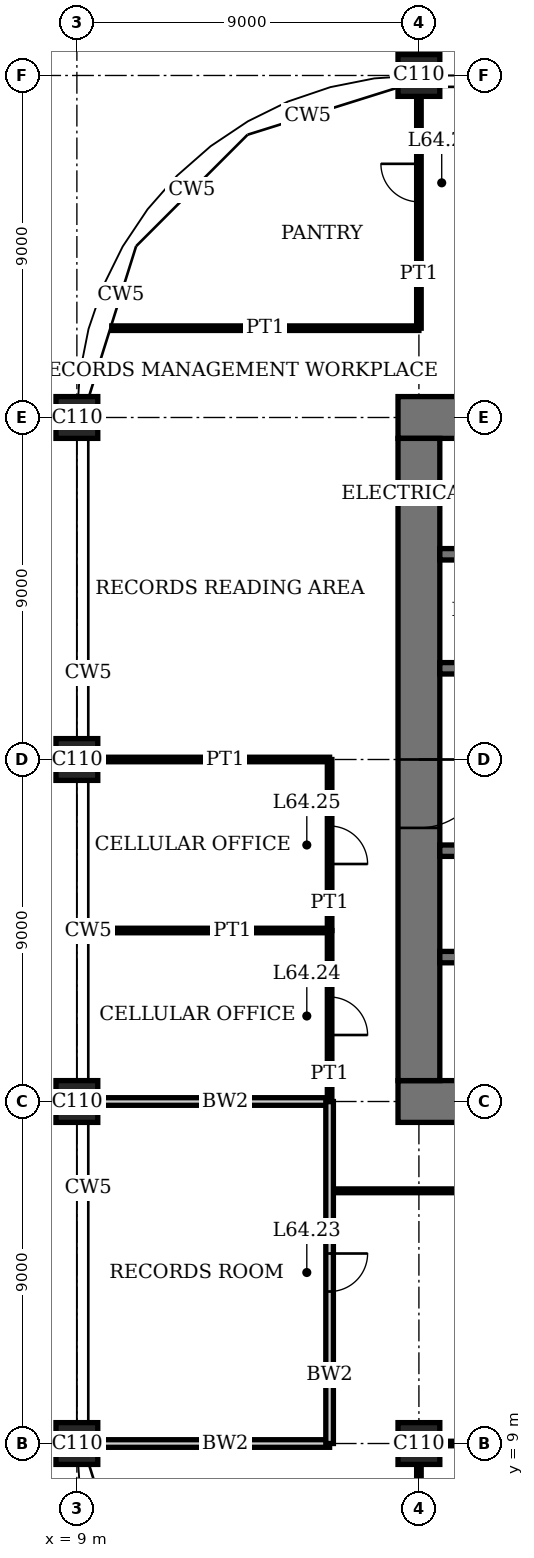
"""IFC4 building model, lengths in metres.
Left out: names, types, materials, properties, quantities, classifications, styles, units other than length and angle.
Written with IfcOpenShell. Run it as: python <this file> out.ifc"""

import sys

from ifc_helpers import new_model, si_unit, direction, frame, frame_2d, origin, origin_2d, place, context, subcontext, project, spatial, rectangle, extrude, element, fill, save


model = new_model("IFC4")
c1 = context("Model", 3, precision=1e-05, world=origin(), true_north=direction((0.0, 1.0)))
c2 = subcontext(c1, "Body", "Model", "MODEL_VIEW")
j1 = project(units=[si_unit("LENGTHUNIT", "METRE"), si_unit("PLANEANGLEUNIT", "RADIAN")], contexts=[c1])
p1 = place(None, origin())
s1 = spatial("IfcSite", under=j1, at=p1, CompositionType="ELEMENT")
p2 = place(p1, origin())
s2 = spatial("IfcBuilding", under=s1, at=p2, CompositionType="ELEMENT")
p3 = place(p2, frame((0.0, 0.0, 263.4)))
s3 = spatial("IfcBuildingStorey", under=s2, at=p3, CompositionType="ELEMENT", Elevation=263.4)
for number, where, z_axis, x_axis in (
    (1, (9.0, 9.0, 0.0), (0.0, 0.0, 1.0), (1.0, 0.0, 0.0)),
    (2, (9.0, 18.0, 0.0), (0.0, 0.0, 1.0), (1.0, 0.0, 0.0)),
    (3, (9.0, 27.0, 0.0), (0.0, 0.0, 1.0), (1.0, 0.0, 0.0)),
    (4, (9.0, 36.0, 0.0), (0.0, 0.0, 1.0), (1.0, 0.0, 0.0)),
    (5, (18.0, 9.0, 0.0), (0.0, 0.0, 1.0), (1.0, 0.0, 0.0)),
    (6, (18.0, 45.0, 0.0), (0.0, 0.0, 1.0), (1.0, 0.0, 0.0)),
):
    element("IfcColumn", number, at=place(p3, frame(where, z_axis=z_axis, x_axis=x_axis)), inside=s3, PredefinedType="COLUMN", context=c2, shape_type="SweptSolid", body=[
        extrude(rectangle(XDim=1.1, YDim=1.1, at=origin_2d()), origin(), (0.0, 0.0, 1.0), 4.0),
    ])
p4 = place(p3, frame((17.45, 18.0, 0.0), z_axis=(0.0, 0.0, 1.0), x_axis=(1.0, 0.0, 0.0)))
e7 = element("IfcWall", 7, at=p4, inside=s3, PredefinedType="SHEAR", context=c2, shape_type="SweptSolid", body=[
    extrude(rectangle(XDim=28.1, YDim=1.1, at=frame_2d((14.05, 0.0))), origin(), (0.0, 0.0, 1.0), 4.0),
])
p5 = place(p4, frame((11.55, 0.0, 0.0)))
e8 = element("IfcOpeningElement", 8, at=p5, cuts=e7, PredefinedType="OPENING", context=c2, shape_type="SweptSolid", body=[
    extrude(rectangle(XDim=1.0, YDim=2.4, at=frame_2d((0.5, 1.2))), frame((0.0, 0.56, 0.0), z_axis=(0.0, -1.0, 0.0), x_axis=(1.0, 0.0, 0.0)), (0.0, 0.0, 1.0), 1.12),
])
p6 = place(p4, frame((16.55, 0.0, 0.0)))
e9 = element("IfcOpeningElement", 9, at=p6, cuts=e7, PredefinedType="OPENING", context=c2, shape_type="SweptSolid", body=[
    extrude(rectangle(XDim=1.0, YDim=2.4, at=frame_2d((0.5, 1.2))), frame((0.0, 0.56, 0.0), z_axis=(0.0, -1.0, 0.0), x_axis=(1.0, 0.0, 0.0)), (0.0, 0.0, 1.0), 1.12),
])
p7 = place(p4, frame((20.0, 0.0, 0.0)))
e10 = element("IfcOpeningElement", 10, at=p7, cuts=e7, PredefinedType="OPENING", context=c2, shape_type="SweptSolid", body=[
    extrude(rectangle(XDim=1.1, YDim=2.4, at=frame_2d((0.55, 1.2))), frame((0.0, 0.56, 0.0), z_axis=(0.0, -1.0, 0.0), x_axis=(1.0, 0.0, 0.0)), (0.0, 0.0, 1.0), 1.12),
])
p8 = place(p4, frame((24.05, 0.0, 0.0)))
e11 = element("IfcOpeningElement", 11, at=p8, cuts=e7, PredefinedType="OPENING", context=c2, shape_type="SweptSolid", body=[
    extrude(rectangle(XDim=1.0, YDim=2.4, at=frame_2d((0.5, 1.2))), frame((0.0, 0.56, 0.0), z_axis=(0.0, -1.0, 0.0), x_axis=(1.0, 0.0, 0.0)), (0.0, 0.0, 1.0), 1.12),
])
p9 = place(p3, frame((45.55, 36.0, 0.0), z_axis=(0.0, 0.0, 1.0), x_axis=(-1.0, 0.0, 0.0)))
e12 = element("IfcWall", 12, at=p9, inside=s3, PredefinedType="SHEAR", context=c2, shape_type="SweptSolid", body=[
    extrude(rectangle(XDim=28.1, YDim=1.1, at=frame_2d((14.05, 0.0))), origin(), (0.0, 0.0, 1.0), 4.0),
])
p10 = place(p9, frame((11.55, 0.0, 0.0)))
e13 = element("IfcOpeningElement", 13, at=p10, cuts=e12, PredefinedType="OPENING", context=c2, shape_type="SweptSolid", body=[
    extrude(rectangle(XDim=1.0, YDim=2.4, at=frame_2d((0.5, 1.2))), frame((0.0, 0.56, 0.0), z_axis=(0.0, -1.0, 0.0), x_axis=(1.0, 0.0, 0.0)), (0.0, 0.0, 1.0), 1.12),
])
p11 = place(p9, frame((16.55, 0.0, 0.0)))
e14 = element("IfcOpeningElement", 14, at=p11, cuts=e12, PredefinedType="OPENING", context=c2, shape_type="SweptSolid", body=[
    extrude(rectangle(XDim=1.0, YDim=2.4, at=frame_2d((0.5, 1.2))), frame((0.0, 0.56, 0.0), z_axis=(0.0, -1.0, 0.0), x_axis=(1.0, 0.0, 0.0)), (0.0, 0.0, 1.0), 1.12),
])
p12 = place(p9, frame((20.0, 0.0, 0.0)))
e15 = element("IfcOpeningElement", 15, at=p12, cuts=e12, PredefinedType="OPENING", context=c2, shape_type="SweptSolid", body=[
    extrude(rectangle(XDim=1.1, YDim=2.4, at=frame_2d((0.55, 1.2))), frame((0.0, 0.56, 0.0), z_axis=(0.0, -1.0, 0.0), x_axis=(1.0, 0.0, 0.0)), (0.0, 0.0, 1.0), 1.12),
])
p13 = place(p9, frame((24.05, 0.0, 0.0)))
e16 = element("IfcOpeningElement", 16, at=p13, cuts=e12, PredefinedType="OPENING", context=c2, shape_type="SweptSolid", body=[
    extrude(rectangle(XDim=1.0, YDim=2.4, at=frame_2d((0.5, 1.2))), frame((0.0, 0.56, 0.0), z_axis=(0.0, -1.0, 0.0), x_axis=(1.0, 0.0, 0.0)), (0.0, 0.0, 1.0), 1.12),
])
p14 = place(p3, frame((18.0, 35.45, 0.0), z_axis=(0.0, 0.0, 1.0), x_axis=(0.0, -1.0, 0.0)))
e17 = element("IfcWall", 17, at=p14, inside=s3, PredefinedType="SHEAR", context=c2, shape_type="SweptSolid", body=[
    extrude(rectangle(XDim=16.9, YDim=1.1, at=frame_2d((8.45, 0.0))), origin(), (0.0, 0.0, 1.0), 4.0),
])
p15 = place(p14, frame((8.45, 0.0, 0.0)))
e18 = element("IfcOpeningElement", 18, at=p15, cuts=e17, PredefinedType="OPENING", context=c2, shape_type="SweptSolid", body=[
    extrude(rectangle(XDim=1.8, YDim=2.4, at=frame_2d((0.9, 1.2))), frame((0.0, 0.56, 0.0), z_axis=(0.0, -1.0, 0.0), x_axis=(1.0, 0.0, 0.0)), (0.0, 0.0, 1.0), 1.12),
])
p16 = place(p3, frame((18.55, 21.8, 0.0), z_axis=(0.0, 0.0, 1.0), x_axis=(1.0, 0.0, 0.0)))
e19 = element("IfcWall", 19, at=p16, inside=s3, PredefinedType="SHEAR", context=c2, shape_type="SweptSolid", body=[
    extrude(rectangle(XDim=8.3, YDim=0.3, at=frame_2d((4.15, 0.0))), origin(), (0.0, 0.0, 1.0), 4.0),
])
p17 = place(p16, frame((6.85, 0.0, 0.0)))
e20 = element("IfcOpeningElement", 20, at=p17, cuts=e19, PredefinedType="OPENING", context=c2, shape_type="SweptSolid", body=[
    extrude(rectangle(XDim=1.0, YDim=2.4, at=frame_2d((0.5, 1.2))), frame((0.0, 0.16, 0.0), z_axis=(0.0, -1.0, 0.0), x_axis=(1.0, 0.0, 0.0)), (0.0, 0.0, 1.0), 0.32),
])
p18 = place(p3, frame((18.55, 24.6, 0.0), z_axis=(0.0, 0.0, 1.0), x_axis=(1.0, 0.0, 0.0)))
e21 = element("IfcWall", 21, at=p18, inside=s3, PredefinedType="SHEAR", context=c2, shape_type="SweptSolid", body=[
    extrude(rectangle(XDim=25.9, YDim=0.3, at=frame_2d((12.95, 0.0))), origin(), (0.0, 0.0, 1.0), 4.0),
])
p19 = place(p18, frame((4.95, 0.0, 0.0)))
e22 = element("IfcOpeningElement", 22, at=p19, cuts=e21, PredefinedType="OPENING", context=c2, shape_type="SweptSolid", body=[
    extrude(rectangle(XDim=1.0, YDim=2.4, at=frame_2d((0.5, 1.2))), frame((0.0, 0.16, 0.0), z_axis=(0.0, -1.0, 0.0), x_axis=(1.0, 0.0, 0.0)), (0.0, 0.0, 1.0), 0.32),
])
p20 = place(p18, frame((24.5, 0.0, 0.0)))
e23 = element("IfcOpeningElement", 23, at=p20, cuts=e21, PredefinedType="OPENING", context=c2, shape_type="SweptSolid", body=[
    extrude(rectangle(XDim=0.9, YDim=2.1, at=frame_2d((0.45, 1.05))), frame((0.0, 0.16, 0.0), z_axis=(0.0, -1.0, 0.0), x_axis=(1.0, 0.0, 0.0)), (0.0, 0.0, 1.0), 0.32),
])
p21 = place(p18, frame((9.4, 0.0, 0.0)))
e24 = element("IfcOpeningElement", 24, at=p21, cuts=e21, PredefinedType="OPENING", context=c2, shape_type="SweptSolid", body=[
    extrude(rectangle(XDim=1.1, YDim=2.4, at=frame_2d((0.55, 1.2))), frame((0.0, 0.16, 0.0), z_axis=(0.0, -1.0, 0.0), x_axis=(1.0, 0.0, 0.0)), (0.0, 0.0, 1.0), 0.32),
])
p22 = place(p18, frame((12.4, 0.0, 0.0)))
e25 = element("IfcOpeningElement", 25, at=p22, cuts=e21, PredefinedType="OPENING", context=c2, shape_type="SweptSolid", body=[
    extrude(rectangle(XDim=1.1, YDim=2.4, at=frame_2d((0.55, 1.2))), frame((0.0, 0.16, 0.0), z_axis=(0.0, -1.0, 0.0), x_axis=(1.0, 0.0, 0.0)), (0.0, 0.0, 1.0), 0.32),
])
p23 = place(p18, frame((15.4, 0.0, 0.0)))
e26 = element("IfcOpeningElement", 26, at=p23, cuts=e21, PredefinedType="OPENING", context=c2, shape_type="SweptSolid", body=[
    extrude(rectangle(XDim=1.1, YDim=2.4, at=frame_2d((0.55, 1.2))), frame((0.0, 0.16, 0.0), z_axis=(0.0, -1.0, 0.0), x_axis=(1.0, 0.0, 0.0)), (0.0, 0.0, 1.0), 0.32),
])
p24 = place(p18, frame((18.4, 0.0, 0.0)))
e27 = element("IfcOpeningElement", 27, at=p24, cuts=e21, PredefinedType="OPENING", context=c2, shape_type="SweptSolid", body=[
    extrude(rectangle(XDim=1.1, YDim=2.4, at=frame_2d((0.55, 1.2))), frame((0.0, 0.16, 0.0), z_axis=(0.0, -1.0, 0.0), x_axis=(1.0, 0.0, 0.0)), (0.0, 0.0, 1.0), 0.32),
])
p25 = place(p18, frame((21.3, 0.0, 0.0)))
e28 = element("IfcOpeningElement", 28, at=p25, cuts=e21, PredefinedType="OPENING", context=c2, shape_type="SweptSolid", body=[
    extrude(rectangle(XDim=1.3, YDim=2.4, at=frame_2d((0.65, 1.2))), frame((0.0, 0.16, 0.0), z_axis=(0.0, -1.0, 0.0), x_axis=(1.0, 0.0, 0.0)), (0.0, 0.0, 1.0), 0.32),
])
p26 = place(p3, frame((18.55, 29.4, 0.0), z_axis=(0.0, 0.0, 1.0), x_axis=(1.0, 0.0, 0.0)))
e29 = element("IfcWall", 29, at=p26, inside=s3, PredefinedType="SHEAR", context=c2, shape_type="SweptSolid", body=[
    extrude(rectangle(XDim=25.9, YDim=0.3, at=frame_2d((12.95, 0.0))), origin(), (0.0, 0.0, 1.0), 4.0),
])
p27 = place(p26, frame((19.95, 0.0, 0.0)))
e30 = element("IfcOpeningElement", 30, at=p27, cuts=e29, PredefinedType="OPENING", context=c2, shape_type="SweptSolid", body=[
    extrude(rectangle(XDim=1.0, YDim=2.4, at=frame_2d((0.5, 1.2))), frame((0.0, 0.16, 0.0), z_axis=(0.0, -1.0, 0.0), x_axis=(1.0, 0.0, 0.0)), (0.0, 0.0, 1.0), 0.32),
])
p28 = place(p26, frame((0.5, 0.0, 0.0)))
e31 = element("IfcOpeningElement", 31, at=p28, cuts=e29, PredefinedType="OPENING", context=c2, shape_type="SweptSolid", body=[
    extrude(rectangle(XDim=0.9, YDim=2.1, at=frame_2d((0.45, 1.05))), frame((0.0, 0.16, 0.0), z_axis=(0.0, -1.0, 0.0), x_axis=(1.0, 0.0, 0.0)), (0.0, 0.0, 1.0), 0.32),
])
p29 = place(p26, frame((15.45, 0.0, 0.0)))
e32 = element("IfcOpeningElement", 32, at=p29, cuts=e29, PredefinedType="OPENING", context=c2, shape_type="SweptSolid", body=[
    extrude(rectangle(XDim=1.0, YDim=2.4, at=frame_2d((0.5, 1.2))), frame((0.0, 0.16, 0.0), z_axis=(0.0, -1.0, 0.0), x_axis=(1.0, 0.0, 0.0)), (0.0, 0.0, 1.0), 0.32),
])
p30 = place(p26, frame((12.45, 0.0, 0.0)))
e33 = element("IfcOpeningElement", 33, at=p30, cuts=e29, PredefinedType="OPENING", context=c2, shape_type="SweptSolid", body=[
    extrude(rectangle(XDim=1.0, YDim=2.4, at=frame_2d((0.5, 1.2))), frame((0.0, 0.16, 0.0), z_axis=(0.0, -1.0, 0.0), x_axis=(1.0, 0.0, 0.0)), (0.0, 0.0, 1.0), 0.32),
])
p31 = place(p26, frame((9.45, 0.0, 0.0)))
e34 = element("IfcOpeningElement", 34, at=p31, cuts=e29, PredefinedType="OPENING", context=c2, shape_type="SweptSolid", body=[
    extrude(rectangle(XDim=1.0, YDim=2.4, at=frame_2d((0.5, 1.2))), frame((0.0, 0.16, 0.0), z_axis=(0.0, -1.0, 0.0), x_axis=(1.0, 0.0, 0.0)), (0.0, 0.0, 1.0), 0.32),
])
p32 = place(p26, frame((6.45, 0.0, 0.0)))
e35 = element("IfcOpeningElement", 35, at=p32, cuts=e29, PredefinedType="OPENING", context=c2, shape_type="SweptSolid", body=[
    extrude(rectangle(XDim=1.0, YDim=2.4, at=frame_2d((0.5, 1.2))), frame((0.0, 0.16, 0.0), z_axis=(0.0, -1.0, 0.0), x_axis=(1.0, 0.0, 0.0)), (0.0, 0.0, 1.0), 0.32),
])
p33 = place(p26, frame((3.3, 0.0, 0.0)))
e36 = element("IfcOpeningElement", 36, at=p33, cuts=e29, PredefinedType="OPENING", context=c2, shape_type="SweptSolid", body=[
    extrude(rectangle(XDim=1.3, YDim=2.4, at=frame_2d((0.65, 1.2))), frame((0.0, 0.16, 0.0), z_axis=(0.0, -1.0, 0.0), x_axis=(1.0, 0.0, 0.0)), (0.0, 0.0, 1.0), 0.32),
])
p34 = place(p3, frame((18.55, 32.4, 0.0), z_axis=(0.0, 0.0, 1.0), x_axis=(1.0, 0.0, 0.0)))
e37 = element("IfcWall", 37, at=p34, inside=s3, PredefinedType="SHEAR", context=c2, shape_type="SweptSolid", body=[
    extrude(rectangle(XDim=17.3, YDim=0.3, at=frame_2d((8.65, 0.0))), origin(), (0.0, 0.0, 1.0), 4.0),
])
p35 = place(p3, frame((9.55, 9.0, 0.0), z_axis=(0.0, 0.0, 1.0), x_axis=(1.0, 0.0, 0.0)))
e38 = element("IfcWall", 38, at=p35, inside=s3, PredefinedType="SOLIDWALL", context=c2, shape_type="SweptSolid", body=[
    extrude(rectangle(XDim=6.1, YDim=0.2, at=frame_2d((3.05, 0.0))), origin(), (0.0, 0.0, 1.0), 3.05),
])
p36 = place(p3, frame((18.55, 9.0, 0.0), z_axis=(0.0, 0.0, 1.0), x_axis=(1.0, 0.0, 0.0)))
e39 = element("IfcWall", 39, at=p36, inside=s3, PredefinedType="PARTITIONING", context=c2, shape_type="SweptSolid", body=[
    extrude(rectangle(XDim=7.9, YDim=0.12, at=frame_2d((3.95, 0.0))), origin(), (0.0, 0.0, 1.0), 3.05),
])
p37 = place(p36, frame((3.45, 0.0, 0.0)))
e40 = element("IfcOpeningElement", 40, at=p37, cuts=e39, PredefinedType="OPENING", context=c2, shape_type="SweptSolid", body=[
    extrude(rectangle(XDim=1.0, YDim=2.4, at=frame_2d((0.5, 1.2))), frame((0.0, 0.07, 0.0), z_axis=(0.0, -1.0, 0.0), x_axis=(1.0, 0.0, 0.0)), (0.0, 0.0, 1.0), 0.14),
])
p38 = place(p3, frame((15.7, 15.65, 0.0), z_axis=(0.0, 0.0, 1.0), x_axis=(1.0, 0.0, 0.0)))
e41 = element("IfcWall", 41, at=p38, inside=s3, PredefinedType="PARTITIONING", context=c2, shape_type="SweptSolid", body=[
    extrude(rectangle(XDim=11.25, YDim=0.1, at=frame_2d((5.625, 0.0))), origin(), (0.0, 0.0, 1.0), 3.75),
])
p39 = place(p3, frame((9.55, 18.0, 0.0), z_axis=(0.0, 0.0, 1.0), x_axis=(1.0, 0.0, 0.0)))
e42 = element("IfcWall", 42, at=p39, inside=s3, PredefinedType="SOLIDWALL", context=c2, shape_type="SweptSolid", body=[
    extrude(rectangle(XDim=6.1, YDim=0.2, at=frame_2d((3.05, 0.0))), origin(), (0.0, 0.0, 1.0), 3.05),
])
p40 = place(p3, frame((9.31, 22.5, 0.0), z_axis=(0.0, 0.0, 1.0), x_axis=(1.0, 0.0, 0.0)))
e43 = element("IfcWall", 43, at=p40, inside=s3, PredefinedType="PARTITIONING", context=c2, shape_type="SweptSolid", body=[
    extrude(rectangle(XDim=6.34, YDim=0.12, at=frame_2d((3.17, 0.0))), origin(), (0.0, 0.0, 1.0), 3.1),
])
p41 = place(p3, frame((9.55, 27.0, 0.0), z_axis=(0.0, 0.0, 1.0), x_axis=(1.0, 0.0, 0.0)))
e44 = element("IfcWall", 44, at=p41, inside=s3, PredefinedType="PARTITIONING", context=c2, shape_type="SweptSolid", body=[
    extrude(rectangle(XDim=6.1, YDim=0.12, at=frame_2d((3.05, 0.0))), origin(), (0.0, 0.0, 1.0), 3.05),
])
p42 = place(p3, frame((9.918, 38.35, 0.0), z_axis=(0.0, 0.0, 1.0), x_axis=(1.0, 0.0, 0.0)))
e45 = element("IfcWall", 45, at=p42, inside=s3, PredefinedType="PARTITIONING", context=c2, shape_type="SweptSolid", body=[
    extrude(rectangle(XDim=8.082, YDim=0.12, at=frame_2d((4.041, 0.0))), origin(), (0.0, 0.0, 1.0), 3.75),
])
p43 = place(p3, frame((15.65, 9.0, 0.0), z_axis=(0.0, 0.0, 1.0), x_axis=(0.0, 1.0, 0.0)))
e46 = element("IfcWall", 46, at=p43, inside=s3, PredefinedType="SOLIDWALL", context=c2, shape_type="SweptSolid", body=[
    extrude(rectangle(XDim=9.0, YDim=0.2, at=frame_2d((4.5, 0.0))), origin(), (0.0, 0.0, 1.0), 3.75),
])
p44 = place(p43, frame((4.0, 0.0, 0.0)))
e47 = element("IfcOpeningElement", 47, at=p44, cuts=e46, PredefinedType="OPENING", context=c2, shape_type="SweptSolid", body=[
    extrude(rectangle(XDim=1.0, YDim=2.4, at=frame_2d((0.5, 1.2))), frame((0.0, 0.11, 0.0), z_axis=(0.0, -1.0, 0.0), x_axis=(1.0, 0.0, 0.0)), (0.0, 0.0, 1.0), 0.22),
])
p45 = place(p3, frame((15.65, 18.0, 0.0), z_axis=(0.0, 0.0, 1.0), x_axis=(0.0, 1.0, 0.0)))
e48 = element("IfcWall", 48, at=p45, inside=s3, PredefinedType="PARTITIONING", context=c2, shape_type="SweptSolid", body=[
    extrude(rectangle(XDim=4.5, YDim=0.12, at=frame_2d((2.25, 0.0))), origin(), (0.0, 0.0, 1.0), 3.75),
])
p46 = place(p45, frame((1.75, 0.0, 0.0)))
e49 = element("IfcOpeningElement", 49, at=p46, cuts=e48, PredefinedType="OPENING", context=c2, shape_type="SweptSolid", body=[
    extrude(rectangle(XDim=1.0, YDim=2.4, at=frame_2d((0.5, 1.2))), frame((0.0, 0.07, 0.0), z_axis=(0.0, -1.0, 0.0), x_axis=(1.0, 0.0, 0.0)), (0.0, 0.0, 1.0), 0.14),
])
p47 = place(p3, frame((15.65, 22.5, 0.0), z_axis=(0.0, 0.0, 1.0), x_axis=(0.0, 1.0, 0.0)))
e50 = element("IfcWall", 50, at=p47, inside=s3, PredefinedType="PARTITIONING", context=c2, shape_type="SweptSolid", body=[
    extrude(rectangle(XDim=4.5, YDim=0.12, at=frame_2d((2.25, 0.0))), origin(), (0.0, 0.0, 1.0), 3.75),
])
p48 = place(p47, frame((1.75, 0.0, 0.0)))
e51 = element("IfcOpeningElement", 51, at=p48, cuts=e50, PredefinedType="OPENING", context=c2, shape_type="SweptSolid", body=[
    extrude(rectangle(XDim=1.0, YDim=2.4, at=frame_2d((0.5, 1.2))), frame((0.0, 0.07, 0.0), z_axis=(0.0, -1.0, 0.0), x_axis=(1.0, 0.0, 0.0)), (0.0, 0.0, 1.0), 0.14),
])
p49 = place(p3, frame((18.0, 0.55, 0.0), z_axis=(0.0, 0.0, 1.0), x_axis=(0.0, 1.0, 0.0)))
e52 = element("IfcWall", 52, at=p49, inside=s3, PredefinedType="PARTITIONING", context=c2, shape_type="SweptSolid", body=[
    extrude(rectangle(XDim=7.9, YDim=0.12, at=frame_2d((3.95, 0.0))), origin(), (0.0, 0.0, 1.0), 3.05),
])
p50 = place(p3, frame((18.0, 38.35, 0.0), z_axis=(0.0, 0.0, 1.0), x_axis=(0.0, 1.0, 0.0)))
e53 = element("IfcWall", 53, at=p50, inside=s3, PredefinedType="PARTITIONING", context=c2, shape_type="SweptSolid", body=[
    extrude(rectangle(XDim=6.1, YDim=0.12, at=frame_2d((3.05, 0.0))), origin(), (0.0, 0.0, 1.0), 3.05),
])
p51 = place(p50, frame((3.325, 0.0, 0.0)))
e54 = element("IfcOpeningElement", 54, at=p51, cuts=e53, PredefinedType="OPENING", context=c2, shape_type="SweptSolid", body=[
    extrude(rectangle(XDim=1.0, YDim=2.4, at=frame_2d((0.5, 1.2))), frame((0.0, 0.07, 0.0), z_axis=(0.0, -1.0, 0.0), x_axis=(1.0, 0.0, 0.0)), (0.0, 0.0, 1.0), 0.14),
])
p52 = place(p15, origin())
e55 = element("IfcDoor", 55, at=p52, inside=s3, OperationType="DOUBLE_DOOR_DOUBLE_SWING", PredefinedType="DOOR", context=c2, shape_type="SweptSolid", body=[
    extrude(rectangle(XDim=1.8, YDim=2.4, at=frame_2d((0.9, 1.2))), frame((0.0, 0.03, 0.0), z_axis=(0.0, -1.0, 0.0), x_axis=(1.0, 0.0, 0.0)), (0.0, 0.0, 1.0), 0.06),
    extrude(rectangle(XDim=0.04, YDim=2.4, at=frame_2d((0.02, 1.2))), frame((0.0, 0.55, 0.0), z_axis=(0.0, -1.0, 0.0), x_axis=(1.0, 0.0, 0.0)), (0.0, 0.0, 1.0), 1.1),
    extrude(rectangle(XDim=0.04, YDim=2.4, at=frame_2d((1.78, 1.2))), frame((0.0, 0.55, 0.0), z_axis=(0.0, -1.0, 0.0), x_axis=(1.0, 0.0, 0.0)), (0.0, 0.0, 1.0), 1.1),
    extrude(rectangle(XDim=1.8, YDim=0.04, at=frame_2d((0.9, 2.38))), frame((0.0, 0.55, 0.0), z_axis=(0.0, -1.0, 0.0), x_axis=(1.0, 0.0, 0.0)), (0.0, 0.0, 1.0), 1.1),
])
fill(e18, e55)
p53 = place(p44, origin())
e56 = element("IfcDoor", 56, at=p53, inside=s3, OperationType="SINGLE_SWING_RIGHT", PredefinedType="DOOR", context=c2, shape_type="SweptSolid", body=[
    extrude(rectangle(XDim=1.0, YDim=2.4, at=frame_2d((0.5, 1.2))), frame((0.0, 0.035, 0.0), z_axis=(0.0, -1.0, 0.0), x_axis=(1.0, 0.0, 0.0)), (0.0, 0.0, 1.0), 0.07),
])
fill(e47, e56)
p54 = place(p46, origin())
e57 = element("IfcDoor", 57, at=p54, inside=s3, OperationType="SINGLE_SWING_LEFT", PredefinedType="DOOR", context=c2, shape_type="SweptSolid", body=[
    extrude(rectangle(XDim=1.0, YDim=2.4, at=frame_2d((0.5, 1.2))), frame((0.0, 0.025, 0.0), z_axis=(0.0, -1.0, 0.0), x_axis=(1.0, 0.0, 0.0)), (0.0, 0.0, 1.0), 0.05),
])
fill(e49, e57)
p55 = place(p48, origin())
e58 = element("IfcDoor", 58, at=p55, inside=s3, OperationType="SINGLE_SWING_LEFT", PredefinedType="DOOR", context=c2, shape_type="SweptSolid", body=[
    extrude(rectangle(XDim=1.0, YDim=2.4, at=frame_2d((0.5, 1.2))), frame((0.0, 0.025, 0.0), z_axis=(0.0, -1.0, 0.0), x_axis=(1.0, 0.0, 0.0)), (0.0, 0.0, 1.0), 0.05),
])
fill(e51, e58)
p56 = place(p51, origin())
e59 = element("IfcDoor", 59, at=p56, inside=s3, OperationType="SINGLE_SWING_LEFT", PredefinedType="DOOR", context=c2, shape_type="SweptSolid", body=[
    extrude(rectangle(XDim=1.0, YDim=2.4, at=frame_2d((0.5, 1.2))), frame((0.0, 0.025, 0.0), z_axis=(0.0, -1.0, 0.0), x_axis=(1.0, 0.0, 0.0)), (0.0, 0.0, 1.0), 0.05),
])
fill(e54, e59)
save(model, sys.argv[1])
